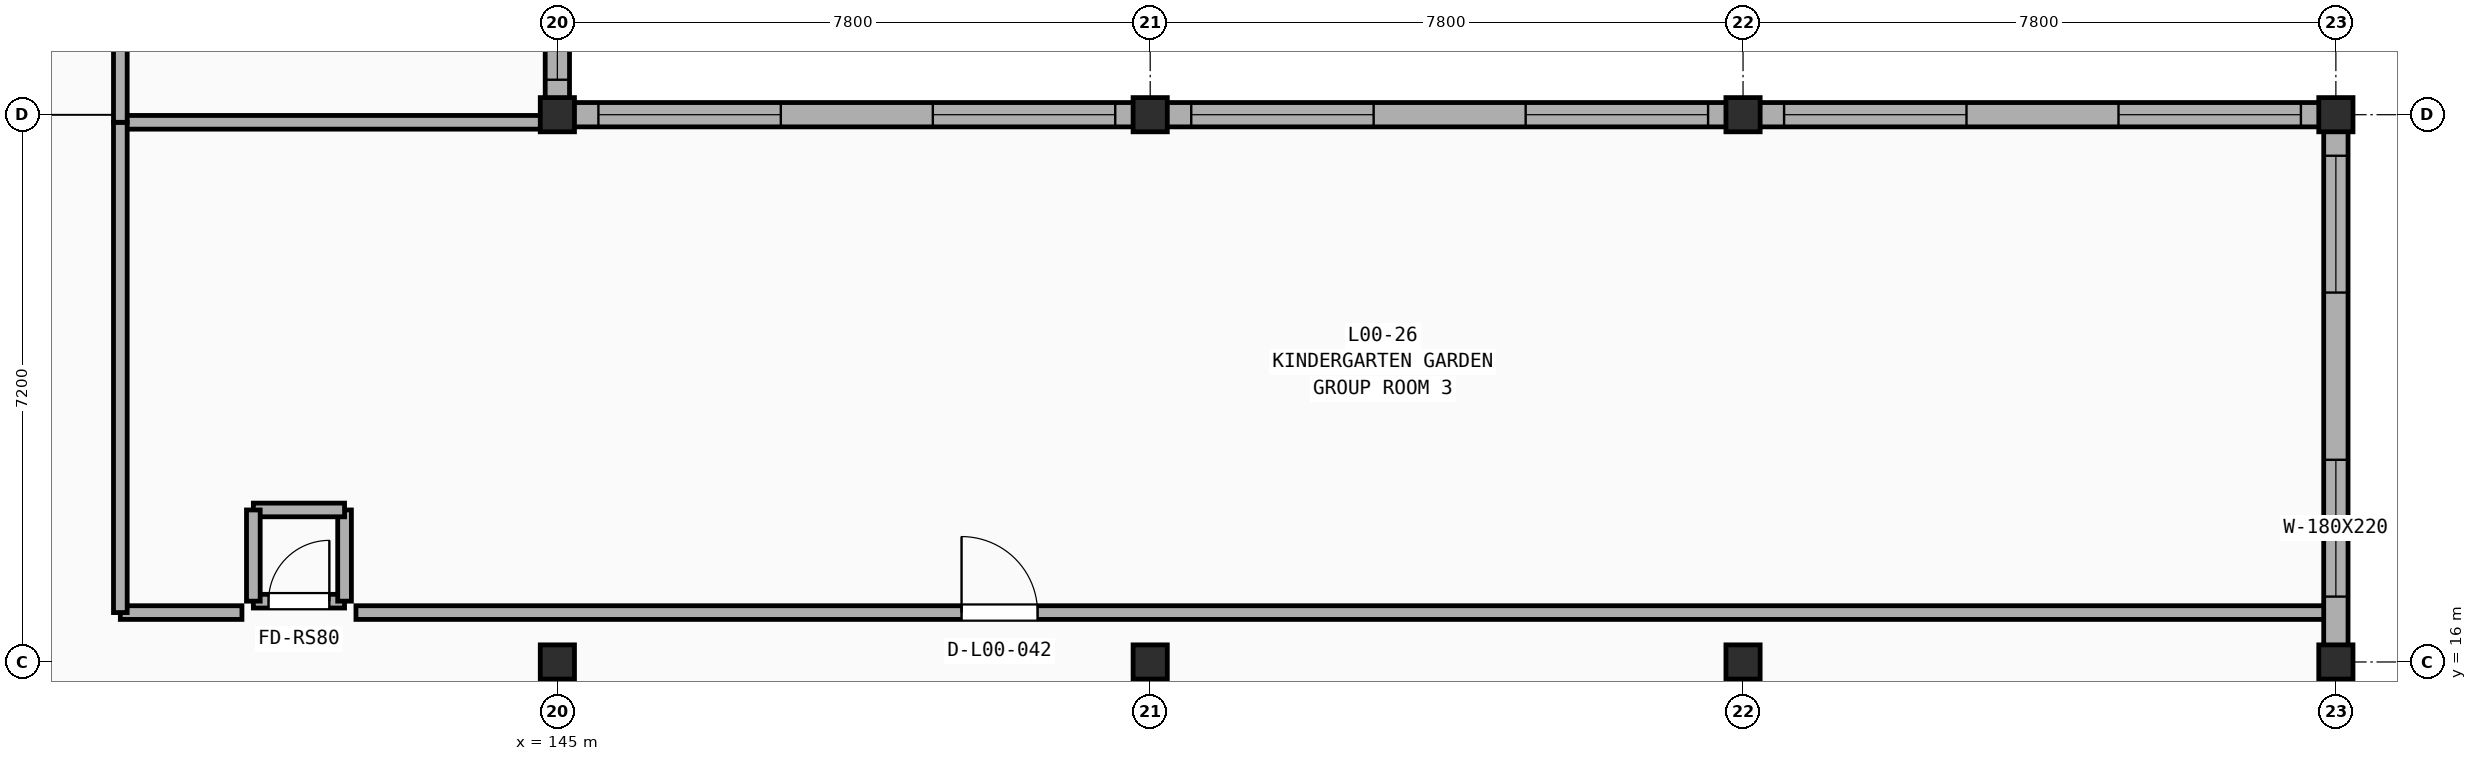
"""IFC4 building model, lengths in metres.
Left out: names, types, materials, properties, quantities, classifications, styles, units other than length and angle.
Written with IfcOpenShell. Run it as: python <this file> out.ifc"""

import sys

from ifc_helpers import new_model, si_unit, direction, frame, frame_2d, origin, origin_2d, place, context, subcontext, project, spatial, rectangle, extrude, element, fill, save


model = new_model("IFC4")
c1 = context("Model", 3, precision=1e-05, world=origin(), true_north=direction((0.0, 1.0)))
c2 = subcontext(c1, "Body", "Model", "MODEL_VIEW")
j1 = project(units=[si_unit("LENGTHUNIT", "METRE"), si_unit("PLANEANGLEUNIT", "RADIAN")], contexts=[c1])
p1 = place(None, origin())
s1 = spatial("IfcSite", under=j1, at=p1, CompositionType="ELEMENT")
p2 = place(p1, origin())
s2 = spatial("IfcBuilding", under=s1, at=p2, CompositionType="ELEMENT")
p3 = place(p2, origin())
s3 = spatial("IfcBuildingStorey", under=s2, at=p3, CompositionType="ELEMENT", Elevation=0.0)
for number, where, z_axis, x_axis in (
    (1, (145.0, 16.0, 0.0), (0.0, 0.0, 1.0), (1.0, 0.0, 0.0)),
    (2, (145.0, 23.2, 0.0), (0.0, 0.0, 1.0), (1.0, 0.0, 0.0)),
    (3, (152.8, 16.0, 0.0), (0.0, 0.0, 1.0), (1.0, 0.0, 0.0)),
    (4, (152.8, 23.2, 0.0), (0.0, 0.0, 1.0), (1.0, 0.0, 0.0)),
    (5, (160.6, 16.0, 0.0), (0.0, 0.0, 1.0), (1.0, 0.0, 0.0)),
    (6, (160.6, 23.2, 0.0), (0.0, 0.0, 1.0), (1.0, 0.0, 0.0)),
    (7, (168.4, 16.0, 0.0), (0.0, 0.0, 1.0), (1.0, 0.0, 0.0)),
    (8, (168.4, 23.2, 0.0), (0.0, 0.0, 1.0), (1.0, 0.0, 0.0)),
):
    element("IfcColumn", number, at=place(p3, frame(where, z_axis=z_axis, x_axis=x_axis)), inside=s3, PredefinedType="COLUMN", context=c2, shape_type="SweptSolid", body=[
        extrude(rectangle(XDim=0.45, YDim=0.45, at=origin_2d()), origin(), (0.0, 0.0, 1.0), 5.4),
    ])
p4 = place(p3, frame((139.25, 16.65, 0.0), z_axis=(0.0, 0.0, 1.0), x_axis=(1.0, 0.0, 0.0)))
e9 = element("IfcWall", 9, at=p4, inside=s3, PredefinedType="PARTITIONING", context=c2, shape_type="SweptSolid", body=[
    extrude(rectangle(XDim=1.6, YDim=0.18, at=frame_2d((0.8, 0.0))), origin(), (0.0, 0.0, 1.0), 5.04),
])
p5 = place(p3, frame((142.35, 16.65, 0.0), z_axis=(0.0, 0.0, 1.0), x_axis=(1.0, 0.0, 0.0)))
e10 = element("IfcWall", 10, at=p5, inside=s3, PredefinedType="PARTITIONING", context=c2, shape_type="SweptSolid", body=[
    extrude(rectangle(XDim=25.9, YDim=0.18, at=frame_2d((12.95, 0.0))), origin(), (0.0, 0.0, 1.0), 4.64),
])
p6 = place(p5, frame((7.968, 0.0, -0.01)))
e11 = element("IfcOpeningElement", 11, at=p6, cuts=e10, PredefinedType="OPENING", context=c2, shape_type="SweptSolid", body=[
    extrude(rectangle(XDim=1.0, YDim=2.16, at=frame_2d((0.5, 1.08))), frame((0.0, 0.1, 0.0), z_axis=(0.0, -1.0, 0.0), x_axis=(1.0, 0.0, 0.0)), (0.0, 0.0, 1.0), 0.2),
])
p7 = place(p3, frame((139.25, 23.1, 0.0), z_axis=(0.0, 0.0, 1.0), x_axis=(1.0, 0.0, 0.0)))
e12 = element("IfcWall", 12, at=p7, inside=s3, PredefinedType="PARTITIONING", context=c2, shape_type="SweptSolid", body=[
    extrude(rectangle(XDim=5.6, YDim=0.18, at=frame_2d((2.8, 0.0))), origin(), (0.0, 0.0, 1.0), 4.64),
])
p8 = place(p3, frame((139.25, 16.65, 0.0), z_axis=(0.0, 0.0, 1.0), x_axis=(0.0, 1.0, 0.0)))
e13 = element("IfcWall", 13, at=p8, inside=s3, PredefinedType="PARTITIONING", context=c2, shape_type="SweptSolid", body=[
    extrude(rectangle(XDim=6.45, YDim=0.18, at=frame_2d((3.225, 0.0))), origin(), (0.0, 0.0, 1.0), 4.64),
])
p9 = place(p3, frame((139.25, 23.1, 0.0), z_axis=(0.0, 0.0, 1.0), x_axis=(0.0, 1.0, 0.0)))
e14 = element("IfcWall", 14, at=p9, inside=s3, PredefinedType="PARTITIONING", context=c2, shape_type="SweptSolid", body=[
    extrude(rectangle(XDim=13.8, YDim=0.18, at=frame_2d((6.9, 0.0))), origin(), (0.0, 0.0, 1.0), 4.54),
])
p10 = place(p9, frame((6.4, 0.0, -0.01)))
e15 = element("IfcOpeningElement", 15, at=p10, cuts=e14, PredefinedType="OPENING", context=c2, shape_type="SweptSolid", body=[
    extrude(rectangle(XDim=1.0, YDim=2.16, at=frame_2d((0.5, 1.08))), frame((0.0, 0.1, 0.0), z_axis=(0.0, -1.0, 0.0), x_axis=(1.0, 0.0, 0.0)), (0.0, 0.0, 1.0), 0.2),
])
p11 = place(p3, frame((152.8, 23.2, 0.0), z_axis=(0.0, 0.0, 1.0), x_axis=(-1.0, 0.0, 0.0)))
e16 = element("IfcWall", 16, at=p11, inside=s3, PredefinedType="SOLIDWALL", context=c2, shape_type="SweptSolid", body=[
    extrude(rectangle(XDim=7.8, YDim=0.32, at=frame_2d((3.9, 0.0))), origin(), (0.0, 0.0, 1.0), 4.64),
])
p12 = place(p11, frame((0.46, 0.0, 0.9)))
e17 = element("IfcOpeningElement", 17, at=p12, cuts=e16, PredefinedType="OPENING", context=c2, shape_type="SweptSolid", body=[
    extrude(rectangle(XDim=2.4, YDim=2.35, at=frame_2d((1.2, 1.175))), frame((0.0, 0.17, 0.0), z_axis=(0.0, -1.0, 0.0), x_axis=(1.0, 0.0, 0.0)), (0.0, 0.0, 1.0), 0.34),
])
p13 = place(p11, frame((4.86, 0.0, 0.9)))
e18 = element("IfcOpeningElement", 18, at=p13, cuts=e16, PredefinedType="OPENING", context=c2, shape_type="SweptSolid", body=[
    extrude(rectangle(XDim=2.4, YDim=2.35, at=frame_2d((1.2, 1.175))), frame((0.0, 0.17, 0.0), z_axis=(0.0, -1.0, 0.0), x_axis=(1.0, 0.0, 0.0)), (0.0, 0.0, 1.0), 0.34),
])
p14 = place(p3, frame((160.6, 23.2, 0.0), z_axis=(0.0, 0.0, 1.0), x_axis=(-1.0, 0.0, 0.0)))
e19 = element("IfcWall", 19, at=p14, inside=s3, PredefinedType="SOLIDWALL", context=c2, shape_type="SweptSolid", body=[
    extrude(rectangle(XDim=7.8, YDim=0.32, at=frame_2d((3.9, 0.0))), origin(), (0.0, 0.0, 1.0), 4.64),
])
p15 = place(p14, frame((0.46, 0.0, 0.9)))
e20 = element("IfcOpeningElement", 20, at=p15, cuts=e19, PredefinedType="OPENING", context=c2, shape_type="SweptSolid", body=[
    extrude(rectangle(XDim=2.4, YDim=2.35, at=frame_2d((1.2, 1.175))), frame((0.0, 0.17, 0.0), z_axis=(0.0, -1.0, 0.0), x_axis=(1.0, 0.0, 0.0)), (0.0, 0.0, 1.0), 0.34),
])
p16 = place(p14, frame((4.86, 0.0, 0.9)))
e21 = element("IfcOpeningElement", 21, at=p16, cuts=e19, PredefinedType="OPENING", context=c2, shape_type="SweptSolid", body=[
    extrude(rectangle(XDim=2.4, YDim=2.35, at=frame_2d((1.2, 1.175))), frame((0.0, 0.17, 0.0), z_axis=(0.0, -1.0, 0.0), x_axis=(1.0, 0.0, 0.0)), (0.0, 0.0, 1.0), 0.34),
])
p17 = place(p3, frame((168.4, 23.2, 0.0), z_axis=(0.0, 0.0, 1.0), x_axis=(-1.0, 0.0, 0.0)))
e22 = element("IfcWall", 22, at=p17, inside=s3, PredefinedType="SOLIDWALL", context=c2, shape_type="SweptSolid", body=[
    extrude(rectangle(XDim=7.8, YDim=0.32, at=frame_2d((3.9, 0.0))), origin(), (0.0, 0.0, 1.0), 4.64),
])
p18 = place(p17, frame((0.46, 0.0, 0.9)))
e23 = element("IfcOpeningElement", 23, at=p18, cuts=e22, PredefinedType="OPENING", context=c2, shape_type="SweptSolid", body=[
    extrude(rectangle(XDim=2.4, YDim=2.35, at=frame_2d((1.2, 1.175))), frame((0.0, 0.17, 0.0), z_axis=(0.0, -1.0, 0.0), x_axis=(1.0, 0.0, 0.0)), (0.0, 0.0, 1.0), 0.34),
])
p19 = place(p17, frame((4.86, 0.0, 0.9)))
e24 = element("IfcOpeningElement", 24, at=p19, cuts=e22, PredefinedType="OPENING", context=c2, shape_type="SweptSolid", body=[
    extrude(rectangle(XDim=2.4, YDim=2.35, at=frame_2d((1.2, 1.175))), frame((0.0, 0.17, 0.0), z_axis=(0.0, -1.0, 0.0), x_axis=(1.0, 0.0, 0.0)), (0.0, 0.0, 1.0), 0.34),
])
p20 = place(p3, frame((168.4, 8.8, 0.0), z_axis=(0.0, 0.0, 1.0), x_axis=(0.0, 1.0, 0.0)))
e25 = element("IfcWall", 25, at=p20, inside=s3, PredefinedType="SOLIDWALL", context=c2, shape_type="SweptSolid", body=[
    extrude(rectangle(XDim=7.2, YDim=0.32, at=frame_2d((3.6, 0.0))), origin(), (0.0, 0.0, 1.0), 4.54),
])
p21 = place(p20, frame((0.46, 0.0, 0.9)))
e26 = element("IfcOpeningElement", 26, at=p21, cuts=e25, PredefinedType="OPENING", context=c2, shape_type="SweptSolid", body=[
    extrude(rectangle(XDim=1.8, YDim=2.2, at=frame_2d((0.9, 1.1))), frame((0.0, 0.17, 0.0), z_axis=(0.0, -1.0, 0.0), x_axis=(1.0, 0.0, 0.0)), (0.0, 0.0, 1.0), 0.34),
])
p22 = place(p20, frame((3.06, 0.0, 0.9)))
e27 = element("IfcOpeningElement", 27, at=p22, cuts=e25, PredefinedType="OPENING", context=c2, shape_type="SweptSolid", body=[
    extrude(rectangle(XDim=1.8, YDim=2.2, at=frame_2d((0.9, 1.1))), frame((0.0, 0.17, 0.0), z_axis=(0.0, -1.0, 0.0), x_axis=(1.0, 0.0, 0.0)), (0.0, 0.0, 1.0), 0.34),
])
p23 = place(p3, frame((168.4, 16.0, 0.0), z_axis=(0.0, 0.0, 1.0), x_axis=(0.0, 1.0, 0.0)))
e28 = element("IfcWall", 28, at=p23, inside=s3, PredefinedType="SOLIDWALL", context=c2, shape_type="SweptSolid", body=[
    extrude(rectangle(XDim=7.2, YDim=0.32, at=frame_2d((3.6, 0.0))), origin(), (0.0, 0.0, 1.0), 4.54),
])
p24 = place(p23, frame((0.86, 0.0, 0.9)))
e29 = element("IfcOpeningElement", 29, at=p24, cuts=e28, PredefinedType="OPENING", context=c2, shape_type="SweptSolid", body=[
    extrude(rectangle(XDim=1.8, YDim=2.2, at=frame_2d((0.9, 1.1))), frame((0.0, 0.17, 0.0), z_axis=(0.0, -1.0, 0.0), x_axis=(1.0, 0.0, 0.0)), (0.0, 0.0, 1.0), 0.34),
])
p25 = place(p23, frame((4.86, 0.0, 0.9)))
e30 = element("IfcOpeningElement", 30, at=p25, cuts=e28, PredefinedType="OPENING", context=c2, shape_type="SweptSolid", body=[
    extrude(rectangle(XDim=1.8, YDim=2.2, at=frame_2d((0.9, 1.1))), frame((0.0, 0.17, 0.0), z_axis=(0.0, -1.0, 0.0), x_axis=(1.0, 0.0, 0.0)), (0.0, 0.0, 1.0), 0.34),
])
p26 = place(p3, frame((145.0, 23.2, 0.0), z_axis=(0.0, 0.0, 1.0), x_axis=(0.0, 1.0, 0.0)))
e31 = element("IfcWall", 31, at=p26, inside=s3, PredefinedType="SOLIDWALL", context=c2, shape_type="SweptSolid", body=[
    extrude(rectangle(XDim=7.2, YDim=0.32, at=frame_2d((3.6, 0.0))), origin(), (0.0, 0.0, 1.0), 4.54),
])
p27 = place(p26, frame((0.46, 0.0, 0.9)))
e32 = element("IfcOpeningElement", 32, at=p27, cuts=e31, PredefinedType="OPENING", context=c2, shape_type="SweptSolid", body=[
    extrude(rectangle(XDim=1.8, YDim=2.2, at=frame_2d((0.9, 1.1))), frame((0.0, 0.17, 0.0), z_axis=(0.0, -1.0, 0.0), x_axis=(1.0, 0.0, 0.0)), (0.0, 0.0, 1.0), 0.34),
])
p28 = place(p26, frame((4.86, 0.0, 0.9)))
e33 = element("IfcOpeningElement", 33, at=p28, cuts=e31, PredefinedType="OPENING", context=c2, shape_type="SweptSolid", body=[
    extrude(rectangle(XDim=1.8, YDim=2.2, at=frame_2d((0.9, 1.1))), frame((0.0, 0.17, 0.0), z_axis=(0.0, -1.0, 0.0), x_axis=(1.0, 0.0, 0.0)), (0.0, 0.0, 1.0), 0.34),
])
p29 = place(p3, frame((141.0, 16.8, 0.0), z_axis=(0.0, 0.0, 1.0), x_axis=(1.0, 0.0, 0.0)))
e34 = element("IfcWall", 34, at=p29, inside=s3, PredefinedType="SOLIDWALL", context=c2, shape_type="SweptSolid", body=[
    extrude(rectangle(XDim=1.2, YDim=0.18, at=frame_2d((0.6, 0.0))), origin(), (0.0, 0.0, 1.0), 5.07),
])
p30 = place(p29, frame((0.2, 0.0, -0.01)))
e35 = element("IfcOpeningElement", 35, at=p30, cuts=e34, PredefinedType="OPENING", context=c2, shape_type="SweptSolid", body=[
    extrude(rectangle(XDim=0.8, YDim=2.06, at=frame_2d((0.4, 1.03))), frame((0.0, 0.1, 0.0), z_axis=(0.0, -1.0, 0.0), x_axis=(1.0, 0.0, 0.0)), (0.0, 0.0, 1.0), 0.2),
])
for number, where, z_axis, x_axis in (
    (36, (142.2, 16.8, 0.0), (0.0, 0.0, 1.0), (0.0, 1.0, 0.0)),
    (37, (142.2, 18.0, 0.0), (0.0, 0.0, 1.0), (-1.0, 0.0, 0.0)),
    (38, (141.0, 18.0, 0.0), (0.0, 0.0, 1.0), (0.0, -1.0, 0.0)),
):
    element("IfcWall", number, at=place(p3, frame(where, z_axis=z_axis, x_axis=x_axis)), inside=s3, PredefinedType="SOLIDWALL", context=c2, shape_type="SweptSolid", body=[
        extrude(rectangle(XDim=1.2, YDim=0.18, at=frame_2d((0.6, 0.0))), origin(), (0.0, 0.0, 1.0), 5.07),
    ])
p31 = place(p6, frame((1.0, 0.0, 0.01), z_axis=(0.0, 0.0, 1.0), x_axis=(-1.0, 0.0, 0.0)))
e39 = element("IfcDoor", 39, at=p31, inside=s3, OperationType="SINGLE_SWING_LEFT", PredefinedType="DOOR", context=c2, shape_type="SweptSolid", body=[
    extrude(rectangle(XDim=1.0, YDim=2.15, at=frame_2d((0.5, 1.075))), frame((0.0, 0.025, 0.0), z_axis=(0.0, -1.0, 0.0), x_axis=(1.0, 0.0, 0.0)), (0.0, 0.0, 1.0), 0.05),
])
fill(e11, e39)
p32 = place(p12, origin())
e40 = element("IfcWindow", 40, at=p32, inside=s3, PartitioningType="TRIPLE_PANEL_VERTICAL", PredefinedType="WINDOW", context=c2, shape_type="SweptSolid", body=[
    extrude(rectangle(XDim=2.4, YDim=2.35, at=frame_2d((1.2, 1.175))), frame((0.0, 0.03, 0.0), z_axis=(0.0, -1.0, 0.0), x_axis=(1.0, 0.0, 0.0)), (0.0, 0.0, 1.0), 0.06),
])
fill(e17, e40)
p33 = place(p13, origin())
e41 = element("IfcWindow", 41, at=p33, inside=s3, PartitioningType="TRIPLE_PANEL_VERTICAL", PredefinedType="WINDOW", context=c2, shape_type="SweptSolid", body=[
    extrude(rectangle(XDim=2.4, YDim=2.35, at=frame_2d((1.2, 1.175))), frame((0.0, 0.03, 0.0), z_axis=(0.0, -1.0, 0.0), x_axis=(1.0, 0.0, 0.0)), (0.0, 0.0, 1.0), 0.06),
])
fill(e18, e41)
p34 = place(p15, origin())
e42 = element("IfcWindow", 42, at=p34, inside=s3, PartitioningType="TRIPLE_PANEL_VERTICAL", PredefinedType="WINDOW", context=c2, shape_type="SweptSolid", body=[
    extrude(rectangle(XDim=2.4, YDim=2.35, at=frame_2d((1.2, 1.175))), frame((0.0, 0.03, 0.0), z_axis=(0.0, -1.0, 0.0), x_axis=(1.0, 0.0, 0.0)), (0.0, 0.0, 1.0), 0.06),
])
fill(e20, e42)
p35 = place(p16, origin())
e43 = element("IfcWindow", 43, at=p35, inside=s3, PartitioningType="TRIPLE_PANEL_VERTICAL", PredefinedType="WINDOW", context=c2, shape_type="SweptSolid", body=[
    extrude(rectangle(XDim=2.4, YDim=2.35, at=frame_2d((1.2, 1.175))), frame((0.0, 0.03, 0.0), z_axis=(0.0, -1.0, 0.0), x_axis=(1.0, 0.0, 0.0)), (0.0, 0.0, 1.0), 0.06),
])
fill(e21, e43)
p36 = place(p18, origin())
e44 = element("IfcWindow", 44, at=p36, inside=s3, PartitioningType="TRIPLE_PANEL_VERTICAL", PredefinedType="WINDOW", context=c2, shape_type="SweptSolid", body=[
    extrude(rectangle(XDim=2.4, YDim=2.35, at=frame_2d((1.2, 1.175))), frame((0.0, 0.03, 0.0), z_axis=(0.0, -1.0, 0.0), x_axis=(1.0, 0.0, 0.0)), (0.0, 0.0, 1.0), 0.06),
])
fill(e23, e44)
p37 = place(p19, origin())
e45 = element("IfcWindow", 45, at=p37, inside=s3, PartitioningType="TRIPLE_PANEL_VERTICAL", PredefinedType="WINDOW", context=c2, shape_type="SweptSolid", body=[
    extrude(rectangle(XDim=2.4, YDim=2.35, at=frame_2d((1.2, 1.175))), frame((0.0, 0.03, 0.0), z_axis=(0.0, -1.0, 0.0), x_axis=(1.0, 0.0, 0.0)), (0.0, 0.0, 1.0), 0.06),
])
fill(e24, e45)
p38 = place(p24, origin())
e46 = element("IfcWindow", 46, at=p38, inside=s3, PartitioningType="DOUBLE_PANEL_VERTICAL", PredefinedType="WINDOW", context=c2, shape_type="SweptSolid", body=[
    extrude(rectangle(XDim=1.8, YDim=2.2, at=frame_2d((0.9, 1.1))), frame((0.0, 0.03, 0.0), z_axis=(0.0, -1.0, 0.0), x_axis=(1.0, 0.0, 0.0)), (0.0, 0.0, 1.0), 0.06),
])
fill(e29, e46)
p39 = place(p25, origin())
e47 = element("IfcWindow", 47, at=p39, inside=s3, PartitioningType="DOUBLE_PANEL_VERTICAL", PredefinedType="WINDOW", context=c2, shape_type="SweptSolid", body=[
    extrude(rectangle(XDim=1.8, YDim=2.2, at=frame_2d((0.9, 1.1))), frame((0.0, 0.03, 0.0), z_axis=(0.0, -1.0, 0.0), x_axis=(1.0, 0.0, 0.0)), (0.0, 0.0, 1.0), 0.06),
])
fill(e30, e47)
p40 = place(p27, origin())
e48 = element("IfcWindow", 48, at=p40, inside=s3, PartitioningType="DOUBLE_PANEL_VERTICAL", PredefinedType="WINDOW", context=c2, shape_type="SweptSolid", body=[
    extrude(rectangle(XDim=1.8, YDim=2.2, at=frame_2d((0.9, 1.1))), frame((0.0, 0.03, 0.0), z_axis=(0.0, -1.0, 0.0), x_axis=(1.0, 0.0, 0.0)), (0.0, 0.0, 1.0), 0.06),
])
fill(e32, e48)
p41 = place(p30, frame((0.0, 0.0, 0.01)))
e49 = element("IfcDoor", 49, at=p41, inside=s3, OperationType="SINGLE_SWING_RIGHT", PredefinedType="DOOR", context=c2, shape_type="SweptSolid", body=[
    extrude(rectangle(XDim=0.8, YDim=2.05, at=frame_2d((0.4, 1.025))), frame((0.0, 0.025, 0.0), z_axis=(0.0, -1.0, 0.0), x_axis=(1.0, 0.0, 0.0)), (0.0, 0.0, 1.0), 0.05),
])
fill(e35, e49)
save(model, sys.argv[1])
